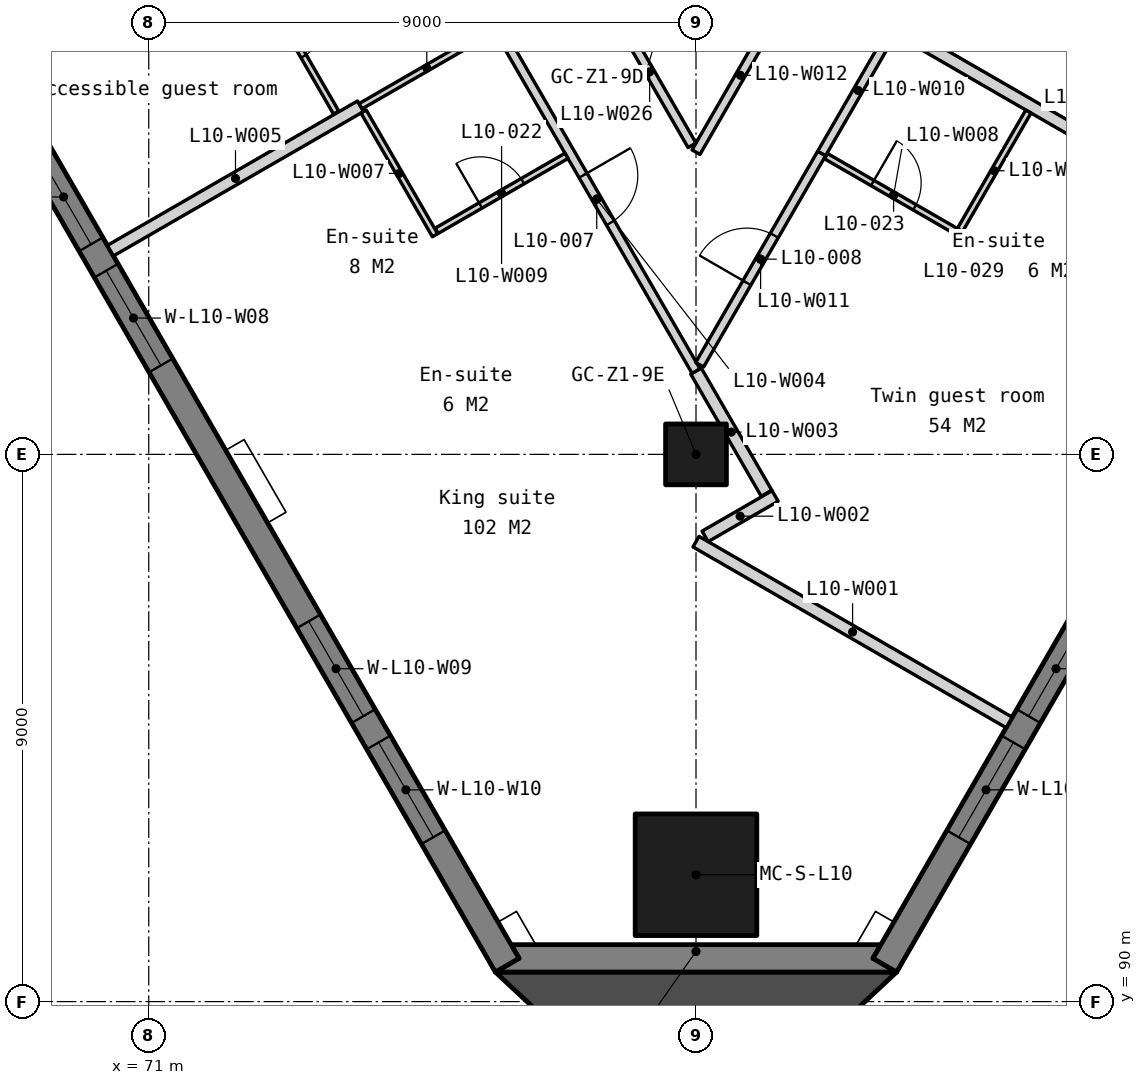
"""IFC4 building model, lengths in metres.
Left out: names, types, materials, properties, quantities, classifications, styles, units other than length and angle.
Written with IfcOpenShell. Run it as: python <this file> out.ifc"""

import sys

from ifc_helpers import new_model, si_unit, direction, frame, frame_2d, origin, origin_2d, place, context, subcontext, project, spatial, polyline, rectangle, outline, extrude, element, fill, save


model = new_model("IFC4")
c1 = context("Model", 3, precision=1e-05, world=origin(), true_north=direction((0.0, 1.0)))
c2 = subcontext(c1, "Body", "Model", "MODEL_VIEW")
j1 = project(units=[si_unit("LENGTHUNIT", "METRE"), si_unit("PLANEANGLEUNIT", "RADIAN")], contexts=[c1])
p1 = place(None, origin())
s1 = spatial("IfcSite", under=j1, at=p1, CompositionType="ELEMENT")
p2 = place(p1, origin())
s2 = spatial("IfcBuilding", under=s1, at=p2, CompositionType="ELEMENT")
p3 = place(p2, frame((0.0, 0.0, 49.0)))
s3 = spatial("IfcBuildingStorey", under=s2, at=p3, CompositionType="ELEMENT", Elevation=49.0)
p4 = place(p3, frame((80.0, 99.0, 0.0), z_axis=(0.0, 0.0, 1.0), x_axis=(1.0, 0.0, 0.0)))
e1 = element("IfcColumn", 1, at=p4, inside=s3, PredefinedType="COLUMN", context=c2, shape_type="SweptSolid", body=[
    extrude(rectangle(XDim=1.0, YDim=1.0, at=origin_2d()), origin(), (0.0, 0.0, 1.0), 3.5),
])
p5 = place(p3, frame((80.0, 92.086, 0.0), z_axis=(0.0, 0.0, 1.0), x_axis=(1.0, 0.0, 0.0)))
e2 = element("IfcColumn", 2, at=p5, inside=s3, PredefinedType="COLUMN", context=c2, shape_type="SweptSolid", body=[
    extrude(rectangle(XDim=2.0, YDim=2.0, at=origin_2d()), origin(), (0.0, 0.0, 1.0), 3.5),
])
p6 = place(p3, frame((0.0, 0.0, -0.15)))
e3 = element("IfcWall", 3, at=p6, inside=s3, PredefinedType="SOLIDWALL", context=c2, shape_type="SweptSolid", body=[
    extrude(outline(polyline([(76.7, 90.486), (77.09, 90.711), (76.96, 90.936), (83.04, 90.936), (82.91, 90.711), (83.3, 90.486), (76.7, 90.486)])), origin(), (0.0, 0.0, 1.0), 3.5),
])
p7 = place(p3, frame((54.495, 129.397, -0.15), z_axis=(0.0, 0.0, 1.0), x_axis=(0.499999201451, -0.866025864826, 0.0)))
e4 = element("IfcWall", 4, at=p7, inside=s3, PredefinedType="SOLIDWALL", context=c2, shape_type="SweptSolid", body=[
    extrude(outline(polyline([(44.8, 0.0), (44.8, 3.5), (0.0, 3.5), (0.0, 0.0), (44.8, 0.0)])), frame((0.0, 0.225, 0.0), z_axis=(0.0, -1.0, 0.0), x_axis=(1.0, 0.0, 0.0)), (0.0, 0.0, 1.0), 0.45),
])
p8 = place(p7, frame((2.43, 0.0, 1.05)))
e5 = element("IfcOpeningElement", 5, at=p8, cuts=e4, PredefinedType="OPENING", context=c2, shape_type="SweptSolid", body=[
    extrude(rectangle(XDim=1.8, YDim=1.5, at=frame_2d((0.9, 0.75))), frame((0.0, 0.235, 0.0), z_axis=(0.0, -1.0, 0.0), x_axis=(1.0, 0.0, 0.0)), (0.0, 0.0, 1.0), 0.47),
])
p9 = place(p7, frame((4.73, 0.0, 1.05)))
e6 = element("IfcOpeningElement", 6, at=p9, cuts=e4, PredefinedType="OPENING", context=c2, shape_type="SweptSolid", body=[
    extrude(rectangle(XDim=1.8, YDim=1.5, at=frame_2d((0.9, 0.75))), frame((0.0, 0.235, 0.0), z_axis=(0.0, -1.0, 0.0), x_axis=(1.0, 0.0, 0.0)), (0.0, 0.0, 1.0), 0.47),
])
p10 = place(p7, frame((11.39, 0.0, 1.05)))
e7 = element("IfcOpeningElement", 7, at=p10, cuts=e4, PredefinedType="OPENING", context=c2, shape_type="SweptSolid", body=[
    extrude(rectangle(XDim=1.8, YDim=1.5, at=frame_2d((0.9, 0.75))), frame((0.0, 0.235, 0.0), z_axis=(0.0, -1.0, 0.0), x_axis=(1.0, 0.0, 0.0)), (0.0, 0.0, 1.0), 0.47),
])
p11 = place(p7, frame((13.69, 0.0, 1.05)))
e8 = element("IfcOpeningElement", 8, at=p11, cuts=e4, PredefinedType="OPENING", context=c2, shape_type="SweptSolid", body=[
    extrude(rectangle(XDim=1.8, YDim=1.5, at=frame_2d((0.9, 0.75))), frame((0.0, 0.235, 0.0), z_axis=(0.0, -1.0, 0.0), x_axis=(1.0, 0.0, 0.0)), (0.0, 0.0, 1.0), 0.47),
])
p12 = place(p7, frame((20.35, 0.0, 1.05)))
e9 = element("IfcOpeningElement", 9, at=p12, cuts=e4, PredefinedType="OPENING", context=c2, shape_type="SweptSolid", body=[
    extrude(rectangle(XDim=1.8, YDim=1.5, at=frame_2d((0.9, 0.75))), frame((0.0, 0.235, 0.0), z_axis=(0.0, -1.0, 0.0), x_axis=(1.0, 0.0, 0.0)), (0.0, 0.0, 1.0), 0.47),
])
p13 = place(p7, frame((22.65, 0.0, 1.05)))
e10 = element("IfcOpeningElement", 10, at=p13, cuts=e4, PredefinedType="OPENING", context=c2, shape_type="SweptSolid", body=[
    extrude(rectangle(XDim=1.8, YDim=1.5, at=frame_2d((0.9, 0.75))), frame((0.0, 0.235, 0.0), z_axis=(0.0, -1.0, 0.0), x_axis=(1.0, 0.0, 0.0)), (0.0, 0.0, 1.0), 0.47),
])
p14 = place(p7, frame((29.31, 0.0, 1.05)))
e11 = element("IfcOpeningElement", 11, at=p14, cuts=e4, PredefinedType="OPENING", context=c2, shape_type="SweptSolid", body=[
    extrude(rectangle(XDim=1.8, YDim=1.5, at=frame_2d((0.9, 0.75))), frame((0.0, 0.235, 0.0), z_axis=(0.0, -1.0, 0.0), x_axis=(1.0, 0.0, 0.0)), (0.0, 0.0, 1.0), 0.47),
])
p15 = place(p7, frame((31.61, 0.0, 1.05)))
e12 = element("IfcOpeningElement", 12, at=p15, cuts=e4, PredefinedType="OPENING", context=c2, shape_type="SweptSolid", body=[
    extrude(rectangle(XDim=1.8, YDim=1.5, at=frame_2d((0.9, 0.75))), frame((0.0, 0.235, 0.0), z_axis=(0.0, -1.0, 0.0), x_axis=(1.0, 0.0, 0.0)), (0.0, 0.0, 1.0), 0.47),
])
p16 = place(p7, frame((38.27, 0.0, 1.05)))
e13 = element("IfcOpeningElement", 13, at=p16, cuts=e4, PredefinedType="OPENING", context=c2, shape_type="SweptSolid", body=[
    extrude(rectangle(XDim=1.8, YDim=1.5, at=frame_2d((0.9, 0.75))), frame((0.0, 0.235, 0.0), z_axis=(0.0, -1.0, 0.0), x_axis=(1.0, 0.0, 0.0)), (0.0, 0.0, 1.0), 0.47),
])
p17 = place(p7, frame((40.57, 0.0, 1.05)))
e14 = element("IfcOpeningElement", 14, at=p17, cuts=e4, PredefinedType="OPENING", context=c2, shape_type="SweptSolid", body=[
    extrude(rectangle(XDim=1.8, YDim=1.5, at=frame_2d((0.9, 0.75))), frame((0.0, 0.235, 0.0), z_axis=(0.0, -1.0, 0.0), x_axis=(1.0, 0.0, 0.0)), (0.0, 0.0, 1.0), 0.47),
])
p18 = place(p3, frame((83.105, 90.599, -0.15), z_axis=(0.0, 0.0, 1.0), x_axis=(0.499999201451, 0.866025864826, 0.0)))
e15 = element("IfcWall", 15, at=p18, inside=s3, PredefinedType="SOLIDWALL", context=c2, shape_type="SweptSolid", body=[
    extrude(outline(polyline([(44.8, 0.0), (44.8, 3.5), (0.0, 3.5), (0.0, 0.0), (44.8, 0.0)])), frame((0.0, 0.225, 0.0), z_axis=(0.0, -1.0, 0.0), x_axis=(1.0, 0.0, 0.0)), (0.0, 0.0, 1.0), 0.45),
])
p19 = place(p18, frame((2.43, 0.0, 1.05)))
e16 = element("IfcOpeningElement", 16, at=p19, cuts=e15, PredefinedType="OPENING", context=c2, shape_type="SweptSolid", body=[
    extrude(rectangle(XDim=1.8, YDim=1.5, at=frame_2d((0.9, 0.75))), frame((0.0, 0.235, 0.0), z_axis=(0.0, -1.0, 0.0), x_axis=(1.0, 0.0, 0.0)), (0.0, 0.0, 1.0), 0.47),
])
p20 = place(p18, frame((4.73, 0.0, 1.05)))
e17 = element("IfcOpeningElement", 17, at=p20, cuts=e15, PredefinedType="OPENING", context=c2, shape_type="SweptSolid", body=[
    extrude(rectangle(XDim=1.8, YDim=1.5, at=frame_2d((0.9, 0.75))), frame((0.0, 0.235, 0.0), z_axis=(0.0, -1.0, 0.0), x_axis=(1.0, 0.0, 0.0)), (0.0, 0.0, 1.0), 0.47),
])
p21 = place(p18, frame((11.39, 0.0, 1.05)))
e18 = element("IfcOpeningElement", 18, at=p21, cuts=e15, PredefinedType="OPENING", context=c2, shape_type="SweptSolid", body=[
    extrude(rectangle(XDim=1.8, YDim=1.5, at=frame_2d((0.9, 0.75))), frame((0.0, 0.235, 0.0), z_axis=(0.0, -1.0, 0.0), x_axis=(1.0, 0.0, 0.0)), (0.0, 0.0, 1.0), 0.47),
])
p22 = place(p18, frame((13.69, 0.0, 1.05)))
e19 = element("IfcOpeningElement", 19, at=p22, cuts=e15, PredefinedType="OPENING", context=c2, shape_type="SweptSolid", body=[
    extrude(rectangle(XDim=1.8, YDim=1.5, at=frame_2d((0.9, 0.75))), frame((0.0, 0.235, 0.0), z_axis=(0.0, -1.0, 0.0), x_axis=(1.0, 0.0, 0.0)), (0.0, 0.0, 1.0), 0.47),
])
p23 = place(p18, frame((20.35, 0.0, 1.05)))
e20 = element("IfcOpeningElement", 20, at=p23, cuts=e15, PredefinedType="OPENING", context=c2, shape_type="SweptSolid", body=[
    extrude(rectangle(XDim=1.8, YDim=1.5, at=frame_2d((0.9, 0.75))), frame((0.0, 0.235, 0.0), z_axis=(0.0, -1.0, 0.0), x_axis=(1.0, 0.0, 0.0)), (0.0, 0.0, 1.0), 0.47),
])
p24 = place(p18, frame((22.65, 0.0, 1.05)))
e21 = element("IfcOpeningElement", 21, at=p24, cuts=e15, PredefinedType="OPENING", context=c2, shape_type="SweptSolid", body=[
    extrude(rectangle(XDim=1.8, YDim=1.5, at=frame_2d((0.9, 0.75))), frame((0.0, 0.235, 0.0), z_axis=(0.0, -1.0, 0.0), x_axis=(1.0, 0.0, 0.0)), (0.0, 0.0, 1.0), 0.47),
])
p25 = place(p18, frame((29.31, 0.0, 1.05)))
e22 = element("IfcOpeningElement", 22, at=p25, cuts=e15, PredefinedType="OPENING", context=c2, shape_type="SweptSolid", body=[
    extrude(rectangle(XDim=1.8, YDim=1.5, at=frame_2d((0.9, 0.75))), frame((0.0, 0.235, 0.0), z_axis=(0.0, -1.0, 0.0), x_axis=(1.0, 0.0, 0.0)), (0.0, 0.0, 1.0), 0.47),
])
p26 = place(p18, frame((31.61, 0.0, 1.05)))
e23 = element("IfcOpeningElement", 23, at=p26, cuts=e15, PredefinedType="OPENING", context=c2, shape_type="SweptSolid", body=[
    extrude(rectangle(XDim=1.8, YDim=1.5, at=frame_2d((0.9, 0.75))), frame((0.0, 0.235, 0.0), z_axis=(0.0, -1.0, 0.0), x_axis=(1.0, 0.0, 0.0)), (0.0, 0.0, 1.0), 0.47),
])
p27 = place(p18, frame((38.27, 0.0, 1.05)))
e24 = element("IfcOpeningElement", 24, at=p27, cuts=e15, PredefinedType="OPENING", context=c2, shape_type="SweptSolid", body=[
    extrude(rectangle(XDim=1.8, YDim=1.5, at=frame_2d((0.9, 0.75))), frame((0.0, 0.235, 0.0), z_axis=(0.0, -1.0, 0.0), x_axis=(1.0, 0.0, 0.0)), (0.0, 0.0, 1.0), 0.47),
])
p28 = place(p18, frame((40.57, 0.0, 1.05)))
e25 = element("IfcOpeningElement", 25, at=p28, cuts=e15, PredefinedType="OPENING", context=c2, shape_type="SweptSolid", body=[
    extrude(rectangle(XDim=1.8, YDim=1.5, at=frame_2d((0.9, 0.75))), frame((0.0, 0.235, 0.0), z_axis=(0.0, -1.0, 0.0), x_axis=(1.0, 0.0, 0.0)), (0.0, 0.0, 1.0), 0.47),
])
p29 = place(p3, frame((0.0, 0.0, -0.15)))
e26 = element("IfcWall", 26, at=p29, inside=s3, PredefinedType="SOLIDWALL", context=c2, shape_type="SweptSolid", body=[
    extrude(outline(polyline([(76.7, 90.486), (80.0, 87.404), (83.3, 90.486), (76.7, 90.486)])), origin(), (0.0, 0.0, 1.0), 3.5),
])
p30 = place(p3, frame((80.0, 97.565, 0.0), z_axis=(0.0, 0.0, 1.0), x_axis=(0.866021515814, -0.500006734102, 0.0)))
e27 = element("IfcWall", 27, at=p30, inside=s3, PredefinedType="PARTITIONING", context=c2, shape_type="SweptSolid", body=[
    extrude(rectangle(XDim=5.947, YDim=0.2, at=frame_2d((2.974, 0.0))), origin(), (0.0, 0.0, 1.0), 3.35),
])
p31 = place(p3, frame((80.15, 97.651, 0.0), z_axis=(0.0, 0.0, 1.0), x_axis=(0.866008217664, 0.500029766052, 0.0)))
e28 = element("IfcWall", 28, at=p31, inside=s3, PredefinedType="PARTITIONING", context=c2, shape_type="SweptSolid", body=[
    extrude(rectangle(XDim=1.33, YDim=0.2, at=frame_2d((0.665, 0.0))), origin(), (0.0, 0.0, 1.0), 3.35),
])
p32 = place(p3, frame((80.0, 100.371, 0.0), z_axis=(0.0, 0.0, 1.0), x_axis=(0.499828727932, -0.86612426518, 0.0)))
e29 = element("IfcWall", 29, at=p32, inside=s3, PredefinedType="PARTITIONING", context=c2, shape_type="SweptSolid", body=[
    extrude(rectangle(XDim=2.32, YDim=0.2, at=frame_2d((1.16, 0.0))), origin(), (0.0, 0.0, 1.0), 3.35),
])
p33 = place(p3, frame((76.735, 106.026, 0.0), z_axis=(0.0, 0.0, 1.0), x_axis=(0.499995393218, -0.866028063495, 0.0)))
e30 = element("IfcWall", 30, at=p33, inside=s3, PredefinedType="PARTITIONING", context=c2, shape_type="SweptSolid", body=[
    extrude(rectangle(XDim=6.53, YDim=0.15, at=frame_2d((3.265, 0.0))), origin(), (0.0, 0.0, 1.0), 3.35),
])
p34 = place(p33, frame((2.815, 0.0, 0.0)))
e31 = element("IfcOpeningElement", 31, at=p34, cuts=e30, PredefinedType="OPENING", context=c2, shape_type="SweptSolid", body=[
    extrude(rectangle(XDim=0.9, YDim=2.1, at=frame_2d((0.45, 1.05))), frame((0.0, 0.085, 0.0), z_axis=(0.0, -1.0, 0.0), x_axis=(1.0, 0.0, 0.0)), (0.0, 0.0, 1.0), 0.17),
])
p35 = place(p3, frame((70.37, 102.351, 0.0), z_axis=(0.0, 0.0, 1.0), x_axis=(0.866033238375, 0.499986429846, 0.0)))
e32 = element("IfcWall", 32, at=p35, inside=s3, PredefinedType="PARTITIONING", context=c2, shape_type="SweptSolid", body=[
    extrude(rectangle(XDim=4.75, YDim=0.2, at=frame_2d((2.375, 0.0))), origin(), (0.0, 0.0, 1.0), 3.35),
])
p36 = place(p3, frame((83.339, 105.983, 0.0), z_axis=(0.0, 0.0, 1.0), x_axis=(0.866023858256, -0.500002676924, 0.0)))
e33 = element("IfcWall", 33, at=p36, inside=s3, PredefinedType="PARTITIONING", context=c2, shape_type="SweptSolid", body=[
    extrude(rectangle(XDim=7.265, YDim=0.2, at=frame_2d((3.633, 0.0))), origin(), (0.0, 0.0, 1.0), 3.35),
])
p37 = place(p3, frame((74.533, 104.639, 0.0), z_axis=(0.0, 0.0, 1.0), x_axis=(0.499938297808, -0.866061024631, 0.0)))
e34 = element("IfcWall", 34, at=p37, inside=s3, PredefinedType="PARTITIONING", context=c2, shape_type="SweptSolid", body=[
    extrude(rectangle(XDim=2.35, YDim=0.1, at=frame_2d((1.175, 0.0))), origin(), (0.0, 0.0, 1.0), 3.35),
])
p38 = place(p3, frame((82.139, 103.905, 0.0), z_axis=(0.0, 0.0, 1.0), x_axis=(0.866014388206, -0.500019079056, 0.0)))
e35 = element("IfcWall", 35, at=p38, inside=s3, PredefinedType="PARTITIONING", context=c2, shape_type="SweptSolid", body=[
    extrude(rectangle(XDim=2.565, YDim=0.1, at=frame_2d((1.282, 0.0))), origin(), (0.0, 0.0, 1.0), 3.35),
])
p39 = place(p38, frame((0.883, 0.0, 0.0)))
e36 = element("IfcOpeningElement", 36, at=p39, cuts=e35, PredefinedType="OPENING", context=c2, shape_type="SweptSolid", body=[
    extrude(rectangle(XDim=0.8, YDim=2.1, at=frame_2d((0.4, 1.05))), frame((0.0, 0.06, 0.0), z_axis=(0.0, -1.0, 0.0), x_axis=(1.0, 0.0, 0.0)), (0.0, 0.0, 1.0), 0.12),
])
p40 = place(p3, frame((75.735, 102.677, 0.0), z_axis=(0.0, 0.0, 1.0), x_axis=(0.866040446274, 0.499973944738, 0.0)))
e37 = element("IfcWall", 37, at=p40, inside=s3, PredefinedType="PARTITIONING", context=c2, shape_type="SweptSolid", body=[
    extrude(rectangle(XDim=2.465, YDim=0.1, at=frame_2d((1.232, 0.0))), origin(), (0.0, 0.0, 1.0), 3.35),
])
p41 = place(p40, frame((0.833, 0.0, 0.0)))
e38 = element("IfcOpeningElement", 38, at=p41, cuts=e37, PredefinedType="OPENING", context=c2, shape_type="SweptSolid", body=[
    extrude(rectangle(XDim=0.8, YDim=2.1, at=frame_2d((0.4, 1.05))), frame((0.0, 0.06, 0.0), z_axis=(0.0, -1.0, 0.0), x_axis=(1.0, 0.0, 0.0)), (0.0, 0.0, 1.0), 0.12),
])
p42 = place(p3, frame((82.065, 103.947, 0.0), z_axis=(0.0, 0.0, 1.0), x_axis=(0.500001309137, 0.866024647952, 0.0)))
e39 = element("IfcWall", 39, at=p42, inside=s3, PredefinedType="PARTITIONING", context=c2, shape_type="SweptSolid", body=[
    extrude(rectangle(XDim=2.4, YDim=0.15, at=frame_2d((1.2, 0.0))), origin(), (0.0, 0.0, 1.0), 3.35),
])
p43 = place(p3, frame((80.06, 100.474, 0.0), z_axis=(0.0, 0.0, 1.0), x_axis=(0.499963124258, 0.866046692957, 0.0)))
e40 = element("IfcWall", 40, at=p43, inside=s3, PredefinedType="PARTITIONING", context=c2, shape_type="SweptSolid", body=[
    extrude(rectangle(XDim=4.01, YDim=0.15, at=frame_2d((2.005, 0.0))), origin(), (0.0, 0.0, 1.0), 3.35),
])
p44 = place(p43, frame((1.555, 0.0, 0.0)))
e41 = element("IfcOpeningElement", 41, at=p44, cuts=e40, PredefinedType="OPENING", context=c2, shape_type="SweptSolid", body=[
    extrude(rectangle(XDim=0.9, YDim=2.1, at=frame_2d((0.45, 1.05))), frame((0.0, 0.085, 0.0), z_axis=(0.0, -1.0, 0.0), x_axis=(1.0, 0.0, 0.0)), (0.0, 0.0, 1.0), 0.17),
])
p45 = place(p3, frame((80.0, 103.97, 0.0), z_axis=(0.0, 0.0, 1.0), x_axis=(0.49998782916, 0.866032430508, 0.0)))
e42 = element("IfcWall", 42, at=p45, inside=s3, PredefinedType="PARTITIONING", context=c2, shape_type="SweptSolid", body=[
    extrude(rectangle(XDim=2.92, YDim=0.15, at=frame_2d((1.46, 0.0))), origin(), (0.0, 0.0, 1.0), 3.35),
])
p46 = place(p3, frame((72.612, 107.167, 0.0), z_axis=(0.0, 0.0, 1.0), x_axis=(0.500050696077, -0.865996132412, 0.0)))
e43 = element("IfcWall", 43, at=p46, inside=s3, PredefinedType="PARTITIONING", context=c2, shape_type="SweptSolid", body=[
    extrude(rectangle(XDim=2.94, YDim=0.1, at=frame_2d((1.47, 0.0))), origin(), (0.0, 0.0, 1.0), 3.35),
])
p47 = place(p46, frame((1.07, 0.0, 0.0)))
e44 = element("IfcOpeningElement", 44, at=p47, cuts=e43, PredefinedType="OPENING", context=c2, shape_type="SweptSolid", body=[
    extrude(rectangle(XDim=0.8, YDim=2.1, at=frame_2d((0.4, 1.05))), frame((0.0, 0.06, 0.0), z_axis=(0.0, -1.0, 0.0), x_axis=(1.0, 0.0, 0.0)), (0.0, 0.0, 1.0), 0.12),
])
p48 = place(p3, frame((84.342, 102.69, 0.0), z_axis=(0.0, 0.0, 1.0), x_axis=(0.499966648284, 0.866044658551, 0.0)))
e45 = element("IfcWall", 45, at=p48, inside=s3, PredefinedType="PARTITIONING", context=c2, shape_type="SweptSolid", body=[
    extrude(rectangle(XDim=2.25, YDim=0.1, at=frame_2d((1.125, 0.0))), origin(), (0.0, 0.0, 1.0), 3.35),
])
p49 = place(p3, frame((74.483, 104.726, 0.0), z_axis=(0.0, 0.0, 1.0), x_axis=(0.866006140796, 0.500033362991, 0.0)))
e46 = element("IfcWall", 46, at=p49, inside=s3, PredefinedType="PARTITIONING", context=c2, shape_type="SweptSolid", body=[
    extrude(rectangle(XDim=2.515, YDim=0.1, at=frame_2d((1.257, 0.0))), origin(), (0.0, 0.0, 1.0), 3.35),
])
p50 = place(p3, frame((78.54, 106.499, 0.0), z_axis=(0.0, 0.0, 1.0), x_axis=(0.499997662712, -0.866026753214, 0.0)))
e47 = element("IfcWall", 47, at=p50, inside=s3, PredefinedType="PARTITIONING", context=c2, shape_type="SweptSolid", body=[
    extrude(rectangle(XDim=2.79, YDim=0.15, at=frame_2d((1.395, 0.0))), origin(), (0.0, 0.0, 1.0), 3.35),
])
p51 = place(p14, origin())
e48 = element("IfcWindow", 48, at=p51, inside=s3, PartitioningType="SINGLE_PANEL", PredefinedType="WINDOW", context=c2, shape_type="SweptSolid", body=[
    extrude(rectangle(XDim=1.8, YDim=1.5, at=frame_2d((0.9, 0.75))), frame((0.0, 0.03, 0.0), z_axis=(0.0, -1.0, 0.0), x_axis=(1.0, 0.0, 0.0)), (0.0, 0.0, 1.0), 0.06),
])
fill(e11, e48)
p52 = place(p15, origin())
e49 = element("IfcWindow", 49, at=p52, inside=s3, PartitioningType="SINGLE_PANEL", PredefinedType="WINDOW", context=c2, shape_type="SweptSolid", body=[
    extrude(rectangle(XDim=1.8, YDim=1.5, at=frame_2d((0.9, 0.75))), frame((0.0, 0.03, 0.0), z_axis=(0.0, -1.0, 0.0), x_axis=(1.0, 0.0, 0.0)), (0.0, 0.0, 1.0), 0.06),
])
fill(e12, e49)
p53 = place(p16, origin())
e50 = element("IfcWindow", 50, at=p53, inside=s3, PartitioningType="SINGLE_PANEL", PredefinedType="WINDOW", context=c2, shape_type="SweptSolid", body=[
    extrude(rectangle(XDim=1.8, YDim=1.5, at=frame_2d((0.9, 0.75))), frame((0.0, 0.03, 0.0), z_axis=(0.0, -1.0, 0.0), x_axis=(1.0, 0.0, 0.0)), (0.0, 0.0, 1.0), 0.06),
])
fill(e13, e50)
p54 = place(p17, origin())
e51 = element("IfcWindow", 51, at=p54, inside=s3, PartitioningType="SINGLE_PANEL", PredefinedType="WINDOW", context=c2, shape_type="SweptSolid", body=[
    extrude(rectangle(XDim=1.8, YDim=1.5, at=frame_2d((0.9, 0.75))), frame((0.0, 0.03, 0.0), z_axis=(0.0, -1.0, 0.0), x_axis=(1.0, 0.0, 0.0)), (0.0, 0.0, 1.0), 0.06),
])
fill(e14, e51)
p55 = place(p19, origin())
e52 = element("IfcWindow", 52, at=p55, inside=s3, PartitioningType="SINGLE_PANEL", PredefinedType="WINDOW", context=c2, shape_type="SweptSolid", body=[
    extrude(rectangle(XDim=1.8, YDim=1.5, at=frame_2d((0.9, 0.75))), frame((0.0, 0.03, 0.0), z_axis=(0.0, -1.0, 0.0), x_axis=(1.0, 0.0, 0.0)), (0.0, 0.0, 1.0), 0.06),
])
fill(e16, e52)
p56 = place(p20, origin())
e53 = element("IfcWindow", 53, at=p56, inside=s3, PartitioningType="SINGLE_PANEL", PredefinedType="WINDOW", context=c2, shape_type="SweptSolid", body=[
    extrude(rectangle(XDim=1.8, YDim=1.5, at=frame_2d((0.9, 0.75))), frame((0.0, 0.03, 0.0), z_axis=(0.0, -1.0, 0.0), x_axis=(1.0, 0.0, 0.0)), (0.0, 0.0, 1.0), 0.06),
])
fill(e17, e53)
p57 = place(p34, origin())
e54 = element("IfcDoor", 54, at=p57, inside=s3, OperationType="SINGLE_SWING_LEFT", PredefinedType="DOOR", context=c2, shape_type="SweptSolid", body=[
    extrude(rectangle(XDim=0.9, YDim=2.1, at=frame_2d((0.45, 1.05))), frame((0.0, 0.025, 0.0), z_axis=(0.0, -1.0, 0.0), x_axis=(1.0, 0.0, 0.0)), (0.0, 0.0, 1.0), 0.05),
])
fill(e31, e54)
p58 = place(p44, origin())
e55 = element("IfcDoor", 55, at=p58, inside=s3, OperationType="SINGLE_SWING_LEFT", PredefinedType="DOOR", context=c2, shape_type="SweptSolid", body=[
    extrude(rectangle(XDim=0.9, YDim=2.1, at=frame_2d((0.45, 1.05))), frame((0.0, 0.025, 0.0), z_axis=(0.0, -1.0, 0.0), x_axis=(1.0, 0.0, 0.0)), (0.0, 0.0, 1.0), 0.05),
])
fill(e41, e55)
p59 = place(p47, origin())
e56 = element("IfcDoor", 56, at=p59, inside=s3, OperationType="SINGLE_SWING_LEFT", PredefinedType="DOOR", context=c2, shape_type="SweptSolid", body=[
    extrude(rectangle(XDim=0.8, YDim=2.1, at=frame_2d((0.4, 1.05))), frame((0.0, 0.025, 0.0), z_axis=(0.0, -1.0, 0.0), x_axis=(1.0, 0.0, 0.0)), (0.0, 0.0, 1.0), 0.05),
])
fill(e44, e56)
p60 = place(p41, origin())
e57 = element("IfcDoor", 57, at=p60, inside=s3, OperationType="SINGLE_SWING_LEFT", PredefinedType="DOOR", context=c2, shape_type="SweptSolid", body=[
    extrude(rectangle(XDim=0.8, YDim=2.1, at=frame_2d((0.4, 1.05))), frame((0.0, 0.025, 0.0), z_axis=(0.0, -1.0, 0.0), x_axis=(1.0, 0.0, 0.0)), (0.0, 0.0, 1.0), 0.05),
])
fill(e38, e57)
p61 = place(p39, origin())
e58 = element("IfcDoor", 58, at=p61, inside=s3, OperationType="SINGLE_SWING_LEFT", PredefinedType="DOOR", context=c2, shape_type="SweptSolid", body=[
    extrude(rectangle(XDim=0.8, YDim=2.1, at=frame_2d((0.4, 1.05))), frame((0.0, 0.025, 0.0), z_axis=(0.0, -1.0, 0.0), x_axis=(1.0, 0.0, 0.0)), (0.0, 0.0, 1.0), 0.05),
])
fill(e36, e58)
save(model, sys.argv[1])
